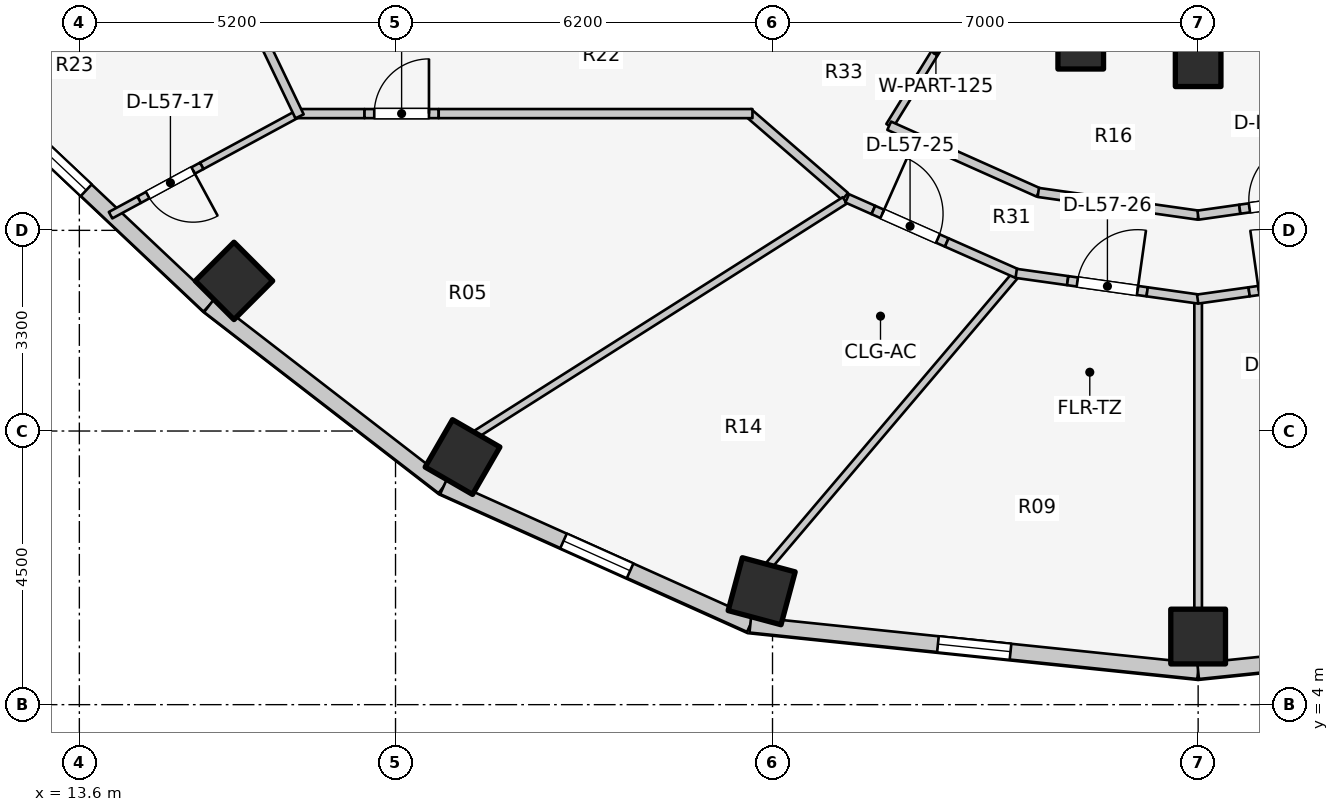
"""IFC4 building model, lengths in metres.
Left out: names, types, materials, properties, quantities, classifications, styles, units other than length and angle.
Written with IfcOpenShell. Run it as: python <this file> out.ifc"""

import sys

from ifc_helpers import new_model, si_unit, direction, frame, frame_2d, origin, origin_2d, place, context, subcontext, project, spatial, rectangle, extrude, element, fill, save


model = new_model("IFC4")
c1 = context("Model", 3, precision=1e-05, world=origin(), true_north=direction((0.0, 1.0)))
c2 = subcontext(c1, "Body", "Model", "MODEL_VIEW")
j1 = project(units=[si_unit("LENGTHUNIT", "METRE"), si_unit("PLANEANGLEUNIT", "RADIAN")], contexts=[c1])
p1 = place(None, origin())
s1 = spatial("IfcSite", under=j1, at=p1, CompositionType="ELEMENT")
p2 = place(p1, origin())
s2 = spatial("IfcBuilding", under=s1, at=p2, CompositionType="ELEMENT")
p3 = place(p2, frame((0.0, 0.0, 187.0)))
s3 = spatial("IfcBuildingStorey", under=s2, at=p3, CompositionType="ELEMENT", Elevation=187.0)
for number, where, z_axis, x_axis in (
    (1, (16.143, 10.969, 0.0), (0.0, 0.0, 1.0), (-0.707, -0.707, 0.0)),
    (2, (19.902, 8.072, 0.0), (0.0, 0.0, 1.0), (-0.5, -0.866, 0.0)),
):
    element("IfcColumn", number, at=place(p3, frame(where, z_axis=z_axis, x_axis=x_axis)), inside=s3, PredefinedType="COLUMN", context=c2, shape_type="SweptSolid", body=[
        extrude(rectangle(XDim=0.9, YDim=0.9, at=origin_2d()), origin(), (0.0, 0.0, 1.0), 3.1),
    ])
p4 = place(p3, frame((30.069, 14.828, 0.0), z_axis=(0.0, 0.0, 1.0), x_axis=(1.0, 0.0, 0.0)))
e3 = element("IfcColumn", 3, at=p4, inside=s3, PredefinedType="COLUMN", context=c2, shape_type="SweptSolid", body=[
    extrude(rectangle(XDim=0.75, YDim=0.75, at=origin_2d()), origin(), (0.0, 0.0, 1.0), 3.1),
])
p5 = place(p3, frame((24.822, 5.865, 0.0), z_axis=(0.0, 0.0, 1.0), x_axis=(-0.258819045103, -0.965925826289, 0.0)))
e4 = element("IfcColumn", 4, at=p5, inside=s3, PredefinedType="COLUMN", context=c2, shape_type="SweptSolid", body=[
    extrude(rectangle(XDim=0.9, YDim=0.9, at=origin_2d()), origin(), (0.0, 0.0, 1.0), 3.1),
])
p6 = place(p3, frame((32.0, 14.54, 0.0), z_axis=(0.0, 0.0, 1.0), x_axis=(1.0, 0.0, 0.0)))
e5 = element("IfcColumn", 5, at=p6, inside=s3, PredefinedType="COLUMN", context=c2, shape_type="SweptSolid", body=[
    extrude(rectangle(XDim=0.75, YDim=0.75, at=origin_2d()), origin(), (0.0, 0.0, 1.0), 3.1),
])
p7 = place(p3, frame((32.0, 5.12, 0.0), z_axis=(0.0, 0.0, 1.0), x_axis=(0.0, -1.0, 0.0)))
e6 = element("IfcColumn", 6, at=p7, inside=s3, PredefinedType="COLUMN", context=c2, shape_type="SweptSolid", body=[
    extrude(rectangle(XDim=0.9, YDim=0.9, at=origin_2d()), origin(), (0.0, 0.0, 1.0), 3.1),
])
p8 = place(p3, frame((12.381, 13.716, 0.0), z_axis=(0.0, 0.0, 1.0), x_axis=(0.727667301037, -0.68593024354, 0.0)))
e7 = element("IfcWall", 7, at=p8, inside=s3, PredefinedType="STANDARD", context=c2, shape_type="SweptSolid", body=[
    extrude(rectangle(XDim=4.604, YDim=0.26, at=frame_2d((2.302, 0.0))), origin(), (0.0, 0.0, 1.0), 1.22),
])
p9 = place(p8, frame((0.631, 0.0, 0.15)))
e8 = element("IfcOpeningElement", 8, at=p9, cuts=e7, PredefinedType="OPENING", context=c2, shape_type="SweptSolid", body=[
    extrude(rectangle(XDim=1.2, YDim=0.9, at=frame_2d((0.6, 0.45))), frame((0.0, 0.14, 0.0), z_axis=(0.0, -1.0, 0.0), x_axis=(1.0, 0.0, 0.0)), (0.0, 0.0, 1.0), 0.28),
])
p10 = place(p3, frame((15.731, 10.559, 0.0), z_axis=(0.0, 0.0, 1.0), x_axis=(0.791460185804, -0.611220724687, 0.0)))
e9 = element("IfcWall", 9, at=p10, inside=s3, PredefinedType="STANDARD", context=c2, shape_type="SweptSolid", body=[
    extrude(rectangle(XDim=4.872, YDim=0.26, at=frame_2d((2.436, 0.0))), origin(), (0.0, 0.0, 1.0), 1.22),
])
p11 = place(p3, frame((19.587, 7.581, 0.0), z_axis=(0.0, 0.0, 1.0), x_axis=(0.912353637112, -0.409403029847, 0.0)))
e10 = element("IfcWall", 10, at=p11, inside=s3, PredefinedType="STANDARD", context=c2, shape_type="SweptSolid", body=[
    extrude(rectangle(XDim=5.533, YDim=0.26, at=frame_2d((2.766, 0.0))), origin(), (0.0, 0.0, 1.0), 1.22),
])
p12 = place(p11, frame((2.167, 0.0, 0.15)))
e11 = element("IfcOpeningElement", 11, at=p12, cuts=e10, PredefinedType="OPENING", context=c2, shape_type="SweptSolid", body=[
    extrude(rectangle(XDim=1.2, YDim=0.9, at=frame_2d((0.6, 0.45))), frame((0.0, 0.14, 0.0), z_axis=(0.0, -1.0, 0.0), x_axis=(1.0, 0.0, 0.0)), (0.0, 0.0, 1.0), 0.28),
])
p13 = place(p3, frame((24.635, 5.315, 0.0), z_axis=(0.0, 0.0, 1.0), x_axis=(0.994664178965, -0.10316574569, 0.0)))
e12 = element("IfcWall", 12, at=p13, inside=s3, PredefinedType="STANDARD", context=c2, shape_type="SweptSolid", body=[
    extrude(rectangle(XDim=7.405, YDim=0.26, at=frame_2d((3.702, 0.0))), origin(), (0.0, 0.0, 1.0), 1.22),
])
p14 = place(p13, frame((3.102, 0.0, 0.15)))
e13 = element("IfcOpeningElement", 13, at=p14, cuts=e12, PredefinedType="OPENING", context=c2, shape_type="SweptSolid", body=[
    extrude(rectangle(XDim=1.2, YDim=0.9, at=frame_2d((0.6, 0.45))), frame((0.0, 0.14, 0.0), z_axis=(0.0, -1.0, 0.0), x_axis=(1.0, 0.0, 0.0)), (0.0, 0.0, 1.0), 0.28),
])
p15 = place(p3, frame((32.0, 4.552, 0.0), z_axis=(0.0, 0.0, 1.0), x_axis=(0.994664178965, 0.10316574569, 0.0)))
e14 = element("IfcWall", 14, at=p15, inside=s3, PredefinedType="STANDARD", context=c2, shape_type="SweptSolid", body=[
    extrude(rectangle(XDim=7.405, YDim=0.26, at=frame_2d((3.702, 0.0))), origin(), (0.0, 0.0, 1.0), 1.22),
])
p16 = place(p15, frame((3.102, 0.0, 0.15)))
e15 = element("IfcOpeningElement", 15, at=p16, cuts=e14, PredefinedType="OPENING", context=c2, shape_type="SweptSolid", body=[
    extrude(rectangle(XDim=1.2, YDim=0.9, at=frame_2d((0.6, 0.45))), frame((0.0, 0.14, 0.0), z_axis=(0.0, -1.0, 0.0), x_axis=(1.0, 0.0, 0.0)), (0.0, 0.0, 1.0), 0.28),
])
p17 = place(p3, frame((17.244, 13.744, 0.0), z_axis=(0.0, 0.0, 1.0), x_axis=(-0.879399863451, -0.476083900339, 0.0)))
e16 = element("IfcWall", 16, at=p17, inside=s3, PredefinedType="MOVABLE", context=c2, shape_type="SweptSolid", body=[
    extrude(rectangle(XDim=1.855, YDim=0.12, at=frame_2d((0.928, 0.0))), origin(), (0.0, 0.0, 1.0), 1.22),
])
p18 = place(p3, frame((15.612, 12.861, 0.0), z_axis=(0.0, 0.0, 1.0), x_axis=(-0.879342939039, -0.476189033433, 0.0)))
e17 = element("IfcWall", 17, at=p18, inside=s3, PredefinedType="MOVABLE", context=c2, shape_type="SweptSolid", body=[
    extrude(rectangle(XDim=1.17, YDim=0.12, at=frame_2d((0.585, 0.0))), origin(), (0.0, 0.0, 1.0), 2.11),
])
p19 = place(p18, frame((0.16, 0.0, 0.0)))
e18 = element("IfcOpeningElement", 18, at=p19, cuts=e17, PredefinedType="OPENING", context=c2, shape_type="SweptSolid", body=[
    extrude(rectangle(XDim=0.85, YDim=2.05, at=frame_2d((0.425, 1.025))), frame((0.0, 0.07, 0.0), z_axis=(0.0, -1.0, 0.0), x_axis=(1.0, 0.0, 0.0)), (0.0, 0.0, 1.0), 0.14),
])
p20 = place(p3, frame((14.583, 12.303, 0.0), z_axis=(0.0, 0.0, 1.0), x_axis=(-0.879427451533, -0.476032937401, 0.0)))
e19 = element("IfcWall", 19, at=p20, inside=s3, PredefinedType="MOVABLE", context=c2, shape_type="SweptSolid", body=[
    extrude(rectangle(XDim=0.534, YDim=0.12, at=frame_2d((0.267, 0.0))), origin(), (0.0, 0.0, 1.0), 2.575),
])
p21 = place(p3, frame((26.193, 12.358, 0.0), z_axis=(0.0, 0.0, 1.0), x_axis=(-0.756055312247, 0.654507727092, 0.0)))
e20 = element("IfcWall", 20, at=p21, inside=s3, PredefinedType="PARTITIONING", context=c2, shape_type="SweptSolid", body=[
    extrude(rectangle(XDim=2.111, YDim=0.15, at=frame_2d((1.055, 0.0))), origin(), (0.0, 0.0, 1.0), 1.22),
])
p22 = place(p3, frame((17.15, 13.72, 0.0), z_axis=(0.0, 0.0, 1.0), x_axis=(1.0, 0.0, 0.0)))
e21 = element("IfcWall", 21, at=p22, inside=s3, PredefinedType="PARTITIONING", context=c2, shape_type="SweptSolid", body=[
    extrude(rectangle(XDim=1.14, YDim=0.15, at=frame_2d((0.57, 0.0))), origin(), (0.0, 0.0, 1.0), 2.575),
])
p23 = place(p3, frame((18.29, 13.72, 0.0), z_axis=(0.0, 0.0, 1.0), x_axis=(1.0, 0.0, 0.0)))
e22 = element("IfcWall", 22, at=p23, inside=s3, PredefinedType="PARTITIONING", context=c2, shape_type="SweptSolid", body=[
    extrude(rectangle(XDim=1.22, YDim=0.15, at=frame_2d((0.61, 0.0))), origin(), (0.0, 0.0, 1.0), 2.575),
])
p24 = place(p23, frame((0.16, 0.0, 0.0)))
e23 = element("IfcOpeningElement", 23, at=p24, cuts=e22, PredefinedType="OPENING", context=c2, shape_type="SweptSolid", body=[
    extrude(rectangle(XDim=0.9, YDim=2.1, at=frame_2d((0.45, 1.05))), frame((0.0, 0.085, 0.0), z_axis=(0.0, -1.0, 0.0), x_axis=(1.0, 0.0, 0.0)), (0.0, 0.0, 1.0), 0.17),
])
p25 = place(p3, frame((19.51, 13.72, 0.0), z_axis=(0.0, 0.0, 1.0), x_axis=(1.0, 0.0, 0.0)))
e24 = element("IfcWall", 24, at=p25, inside=s3, PredefinedType="PARTITIONING", context=c2, shape_type="SweptSolid", body=[
    extrude(rectangle(XDim=5.16, YDim=0.15, at=frame_2d((2.58, 0.0))), origin(), (0.0, 0.0, 1.0), 1.22),
])
p26 = place(p3, frame((17.222, 13.675, 0.0), z_axis=(0.0, 0.0, 1.0), x_axis=(-0.431973389813, 0.901886351207, 0.0)))
e25 = element("IfcWall", 25, at=p26, inside=s3, PredefinedType="PARTITIONING", context=c2, shape_type="SweptSolid", body=[
    extrude(rectangle(XDim=2.452, YDim=0.15, at=frame_2d((1.226, 0.0))), origin(), (0.0, 0.0, 1.0), 2.575),
])
p27 = place(p3, frame((28.45, 15.985, 0.0), z_axis=(0.0, 0.0, 1.0), x_axis=(-0.525627246902, -0.850714991824, 0.0)))
e26 = element("IfcWall", 26, at=p27, inside=s3, PredefinedType="PARTITIONING", context=c2, shape_type="SweptSolid", body=[
    extrude(rectangle(XDim=2.901, YDim=0.125, at=frame_2d((1.451, 0.0))), origin(), (0.0, 0.0, 1.0), 1.22),
])
p28 = place(p3, frame((26.919, 13.521, 0.0), z_axis=(0.0, 0.0, 1.0), x_axis=(0.912888568324, -0.408208845842, 0.0)))
e27 = element("IfcWall", 27, at=p28, inside=s3, PredefinedType="PARTITIONING", context=c2, shape_type="SweptSolid", body=[
    extrude(rectangle(XDim=2.69, YDim=0.15, at=frame_2d((1.345, 0.0))), origin(), (0.0, 0.0, 1.0), 1.22),
])
p29 = place(p3, frame((29.371, 12.424, 0.0), z_axis=(0.0, 0.0, 1.0), x_axis=(0.990066775667, -0.1405979364, 0.0)))
e28 = element("IfcWall", 28, at=p29, inside=s3, PredefinedType="PARTITIONING", context=c2, shape_type="SweptSolid", body=[
    extrude(rectangle(XDim=2.657, YDim=0.15, at=frame_2d((1.328, 0.0))), origin(), (0.0, 0.0, 1.0), 1.22),
])
p30 = place(p3, frame((31.998, 12.05, 0.0), z_axis=(0.0, 0.0, 1.0), x_axis=(0.990082845611, 0.140484728093, 0.0)))
e29 = element("IfcWall", 29, at=p30, inside=s3, PredefinedType="PARTITIONING", context=c2, shape_type="SweptSolid", body=[
    extrude(rectangle(XDim=0.693, YDim=0.15, at=frame_2d((0.347, 0.0))), origin(), (0.0, 0.0, 1.0), 1.22),
])
p31 = place(p3, frame((32.685, 12.147, 0.0), z_axis=(0.0, 0.0, 1.0), x_axis=(0.990049212475, 0.140721557967, 0.0)))
e30 = element("IfcWall", 30, at=p31, inside=s3, PredefinedType="PARTITIONING", context=c2, shape_type="SweptSolid", body=[
    extrude(rectangle(XDim=1.27, YDim=0.15, at=frame_2d((0.635, 0.0))), origin(), (0.0, 0.0, 1.0), 2.575),
])
p32 = place(p31, frame((0.16, 0.0, 0.0)))
e31 = element("IfcOpeningElement", 31, at=p32, cuts=e30, PredefinedType="OPENING", context=c2, shape_type="SweptSolid", body=[
    extrude(rectangle(XDim=0.95, YDim=2.1, at=frame_2d((0.475, 1.05))), frame((0.0, 0.085, 0.0), z_axis=(0.0, -1.0, 0.0), x_axis=(1.0, 0.0, 0.0)), (0.0, 0.0, 1.0), 0.17),
])
p33 = place(p3, frame((26.188, 12.292, 0.0), z_axis=(0.0, 0.0, 1.0), x_axis=(-0.844640430122, -0.535334048799, 0.0)))
e32 = element("IfcWall", 32, at=p33, inside=s3, PredefinedType="PARTITIONING", context=c2, shape_type="SweptSolid", body=[
    extrude(rectangle(XDim=7.188, YDim=0.125, at=frame_2d((3.594, 0.0))), origin(), (0.0, 0.0, 1.0), 1.22),
])
p34 = place(p3, frame((28.98, 11.048, 0.0), z_axis=(0.0, 0.0, 1.0), x_axis=(-0.647173462792, -0.762342776615, 0.0)))
e33 = element("IfcWall", 33, at=p34, inside=s3, PredefinedType="PARTITIONING", context=c2, shape_type="SweptSolid", body=[
    extrude(rectangle(XDim=6.253, YDim=0.125, at=frame_2d((3.127, 0.0))), origin(), (0.0, 0.0, 1.0), 1.22),
])
p35 = place(p3, frame((32.0, 10.615, 0.0), z_axis=(0.0, 0.0, 1.0), x_axis=(0.0, -1.0, 0.0)))
e34 = element("IfcWall", 34, at=p35, inside=s3, PredefinedType="PARTITIONING", context=c2, shape_type="SweptSolid", body=[
    extrude(rectangle(XDim=5.065, YDim=0.125, at=frame_2d((2.532, 0.0))), origin(), (0.0, 0.0, 1.0), 1.22),
])
p36 = place(p3, frame((26.228, 12.326, 0.0), z_axis=(0.0, 0.0, 1.0), x_axis=(0.914387769504, -0.404839482983, 0.0)))
e35 = element("IfcWall", 35, at=p36, inside=s3, PredefinedType="PARTITIONING", context=c2, shape_type="SweptSolid", body=[
    extrude(rectangle(XDim=0.471, YDim=0.15, at=frame_2d((0.235, 0.0))), origin(), (0.0, 0.0, 1.0), 2.575),
])
p37 = place(p3, frame((26.659, 12.135, 0.0), z_axis=(0.0, 0.0, 1.0), x_axis=(0.914314172667, -0.405005671145, 0.0)))
e36 = element("IfcWall", 36, at=p37, inside=s3, PredefinedType="PARTITIONING", context=c2, shape_type="SweptSolid", body=[
    extrude(rectangle(XDim=1.32, YDim=0.15, at=frame_2d((0.66, 0.0))), origin(), (0.0, 0.0, 1.0), 2.16),
])
p38 = place(p37, frame((0.16, 0.0, 0.0)))
e37 = element("IfcOpeningElement", 37, at=p38, cuts=e36, PredefinedType="OPENING", context=c2, shape_type="SweptSolid", body=[
    extrude(rectangle(XDim=1.0, YDim=2.1, at=frame_2d((0.5, 1.05))), frame((0.0, 0.085, 0.0), z_axis=(0.0, -1.0, 0.0), x_axis=(1.0, 0.0, 0.0)), (0.0, 0.0, 1.0), 0.17),
])
p39 = place(p3, frame((27.866, 11.601, 0.0), z_axis=(0.0, 0.0, 1.0), x_axis=(0.914311660367, -0.405011342701, 0.0)))
e38 = element("IfcWall", 38, at=p39, inside=s3, PredefinedType="PARTITIONING", context=c2, shape_type="SweptSolid", body=[
    extrude(rectangle(XDim=1.267, YDim=0.15, at=frame_2d((0.633, 0.0))), origin(), (0.0, 0.0, 1.0), 1.22),
])
p40 = place(p3, frame((29.008, 11.092, 0.0), z_axis=(0.0, 0.0, 1.0), x_axis=(0.990238723834, -0.139381741342, 0.0)))
e39 = element("IfcWall", 39, at=p40, inside=s3, PredefinedType="PARTITIONING", context=c2, shape_type="SweptSolid", body=[
    extrude(rectangle(XDim=0.855, YDim=0.15, at=frame_2d((0.427, 0.0))), origin(), (0.0, 0.0, 1.0), 2.575),
])
p41 = place(p3, frame((29.854, 10.973, 0.0), z_axis=(0.0, 0.0, 1.0), x_axis=(0.990254187593, -0.139271834751, 0.0)))
e40 = element("IfcWall", 40, at=p41, inside=s3, PredefinedType="PARTITIONING", context=c2, shape_type="SweptSolid", body=[
    extrude(rectangle(XDim=1.32, YDim=0.15, at=frame_2d((0.66, 0.0))), origin(), (0.0, 0.0, 1.0), 2.575),
])
p42 = place(p41, frame((0.16, 0.0, 0.0)))
e41 = element("IfcOpeningElement", 41, at=p42, cuts=e40, PredefinedType="OPENING", context=c2, shape_type="SweptSolid", body=[
    extrude(rectangle(XDim=1.0, YDim=2.1, at=frame_2d((0.5, 1.05))), frame((0.0, 0.085, 0.0), z_axis=(0.0, -1.0, 0.0), x_axis=(1.0, 0.0, 0.0)), (0.0, 0.0, 1.0), 0.17),
])
for number, where, z_axis, x_axis in (
    (42, (31.162, 10.789, 0.0), (0.0, 0.0, 1.0), (0.99, -0.14, 0.0)),
    (43, (31.992, 10.67, 0.0), (0.0, 0.0, 1.0), (0.99, 0.14, 0.0)),
):
    element("IfcWall", number, at=place(p3, frame(where, z_axis=z_axis, x_axis=x_axis)), inside=s3, PredefinedType="PARTITIONING", context=c2, shape_type="SweptSolid", body=[
        extrude(rectangle(XDim=0.855, YDim=0.15, at=frame_2d((0.427, 0.0))), origin(), (0.0, 0.0, 1.0), 1.22),
    ])
p43 = place(p3, frame((32.838, 10.789, 0.0), z_axis=(0.0, 0.0, 1.0), x_axis=(0.990254187593, 0.139271834751, 0.0)))
e44 = element("IfcWall", 44, at=p43, inside=s3, PredefinedType="PARTITIONING", context=c2, shape_type="SweptSolid", body=[
    extrude(rectangle(XDim=1.32, YDim=0.15, at=frame_2d((0.66, 0.0))), origin(), (0.0, 0.0, 1.0), 2.575),
])
p44 = place(p43, frame((0.16, 0.0, 0.0)))
e45 = element("IfcOpeningElement", 45, at=p44, cuts=e44, PredefinedType="OPENING", context=c2, shape_type="SweptSolid", body=[
    extrude(rectangle(XDim=1.0, YDim=2.1, at=frame_2d((0.5, 1.05))), frame((0.0, 0.085, 0.0), z_axis=(0.0, -1.0, 0.0), x_axis=(1.0, 0.0, 0.0)), (0.0, 0.0, 1.0), 0.17),
])
p45 = place(p9, origin())
e46 = element("IfcWindow", 46, at=p45, inside=s3, PartitioningType="SINGLE_PANEL", PredefinedType="WINDOW", context=c2, shape_type="SweptSolid", body=[
    extrude(rectangle(XDim=1.2, YDim=0.9, at=frame_2d((0.6, 0.45))), frame((0.0, 0.03, 0.0), z_axis=(0.0, -1.0, 0.0), x_axis=(1.0, 0.0, 0.0)), (0.0, 0.0, 1.0), 0.06),
])
fill(e8, e46)
p46 = place(p12, origin())
e47 = element("IfcWindow", 47, at=p46, inside=s3, PartitioningType="SINGLE_PANEL", PredefinedType="WINDOW", context=c2, shape_type="SweptSolid", body=[
    extrude(rectangle(XDim=1.2, YDim=0.9, at=frame_2d((0.6, 0.45))), frame((0.0, 0.03, 0.0), z_axis=(0.0, -1.0, 0.0), x_axis=(1.0, 0.0, 0.0)), (0.0, 0.0, 1.0), 0.06),
])
fill(e11, e47)
p47 = place(p14, origin())
e48 = element("IfcWindow", 48, at=p47, inside=s3, PartitioningType="SINGLE_PANEL", PredefinedType="WINDOW", context=c2, shape_type="SweptSolid", body=[
    extrude(rectangle(XDim=1.2, YDim=0.9, at=frame_2d((0.6, 0.45))), frame((0.0, 0.03, 0.0), z_axis=(0.0, -1.0, 0.0), x_axis=(1.0, 0.0, 0.0)), (0.0, 0.0, 1.0), 0.06),
])
fill(e13, e48)
p48 = place(p19, origin())
e49 = element("IfcDoor", 49, at=p48, inside=s3, OperationType="SINGLE_SWING_LEFT", PredefinedType="DOOR", context=c2, shape_type="SweptSolid", body=[
    extrude(rectangle(XDim=0.85, YDim=2.05, at=frame_2d((0.425, 1.025))), frame((0.0, 0.025, 0.0), z_axis=(0.0, -1.0, 0.0), x_axis=(1.0, 0.0, 0.0)), (0.0, 0.0, 1.0), 0.05),
])
fill(e18, e49)
p49 = place(p24, origin())
e50 = element("IfcDoor", 50, at=p49, inside=s3, OperationType="SINGLE_SWING_RIGHT", PredefinedType="DOOR", context=c2, shape_type="SweptSolid", body=[
    extrude(rectangle(XDim=0.9, YDim=2.1, at=frame_2d((0.45, 1.05))), frame((0.0, 0.025, 0.0), z_axis=(0.0, -1.0, 0.0), x_axis=(1.0, 0.0, 0.0)), (0.0, 0.0, 1.0), 0.05),
])
fill(e23, e50)
p50 = place(p32, origin())
e51 = element("IfcDoor", 51, at=p50, inside=s3, OperationType="SINGLE_SWING_RIGHT", PredefinedType="DOOR", context=c2, shape_type="SweptSolid", body=[
    extrude(rectangle(XDim=0.95, YDim=2.1, at=frame_2d((0.475, 1.05))), frame((0.0, 0.025, 0.0), z_axis=(0.0, -1.0, 0.0), x_axis=(1.0, 0.0, 0.0)), (0.0, 0.0, 1.0), 0.05),
])
fill(e31, e51)
p51 = place(p38, origin())
e52 = element("IfcDoor", 52, at=p51, inside=s3, OperationType="SINGLE_SWING_LEFT", PredefinedType="DOOR", context=c2, shape_type="SweptSolid", body=[
    extrude(rectangle(XDim=1.0, YDim=2.1, at=frame_2d((0.5, 1.05))), frame((0.0, 0.025, 0.0), z_axis=(0.0, -1.0, 0.0), x_axis=(1.0, 0.0, 0.0)), (0.0, 0.0, 1.0), 0.05),
])
fill(e37, e52)
p52 = place(p42, origin())
e53 = element("IfcDoor", 53, at=p52, inside=s3, OperationType="SINGLE_SWING_RIGHT", PredefinedType="DOOR", context=c2, shape_type="SweptSolid", body=[
    extrude(rectangle(XDim=1.0, YDim=2.1, at=frame_2d((0.5, 1.05))), frame((0.0, 0.025, 0.0), z_axis=(0.0, -1.0, 0.0), x_axis=(1.0, 0.0, 0.0)), (0.0, 0.0, 1.0), 0.05),
])
fill(e41, e53)
p53 = place(p44, origin())
e54 = element("IfcDoor", 54, at=p53, inside=s3, OperationType="SINGLE_SWING_LEFT", PredefinedType="DOOR", context=c2, shape_type="SweptSolid", body=[
    extrude(rectangle(XDim=1.0, YDim=2.1, at=frame_2d((0.5, 1.05))), frame((0.0, 0.025, 0.0), z_axis=(0.0, -1.0, 0.0), x_axis=(1.0, 0.0, 0.0)), (0.0, 0.0, 1.0), 0.05),
])
fill(e45, e54)
save(model, sys.argv[1])
